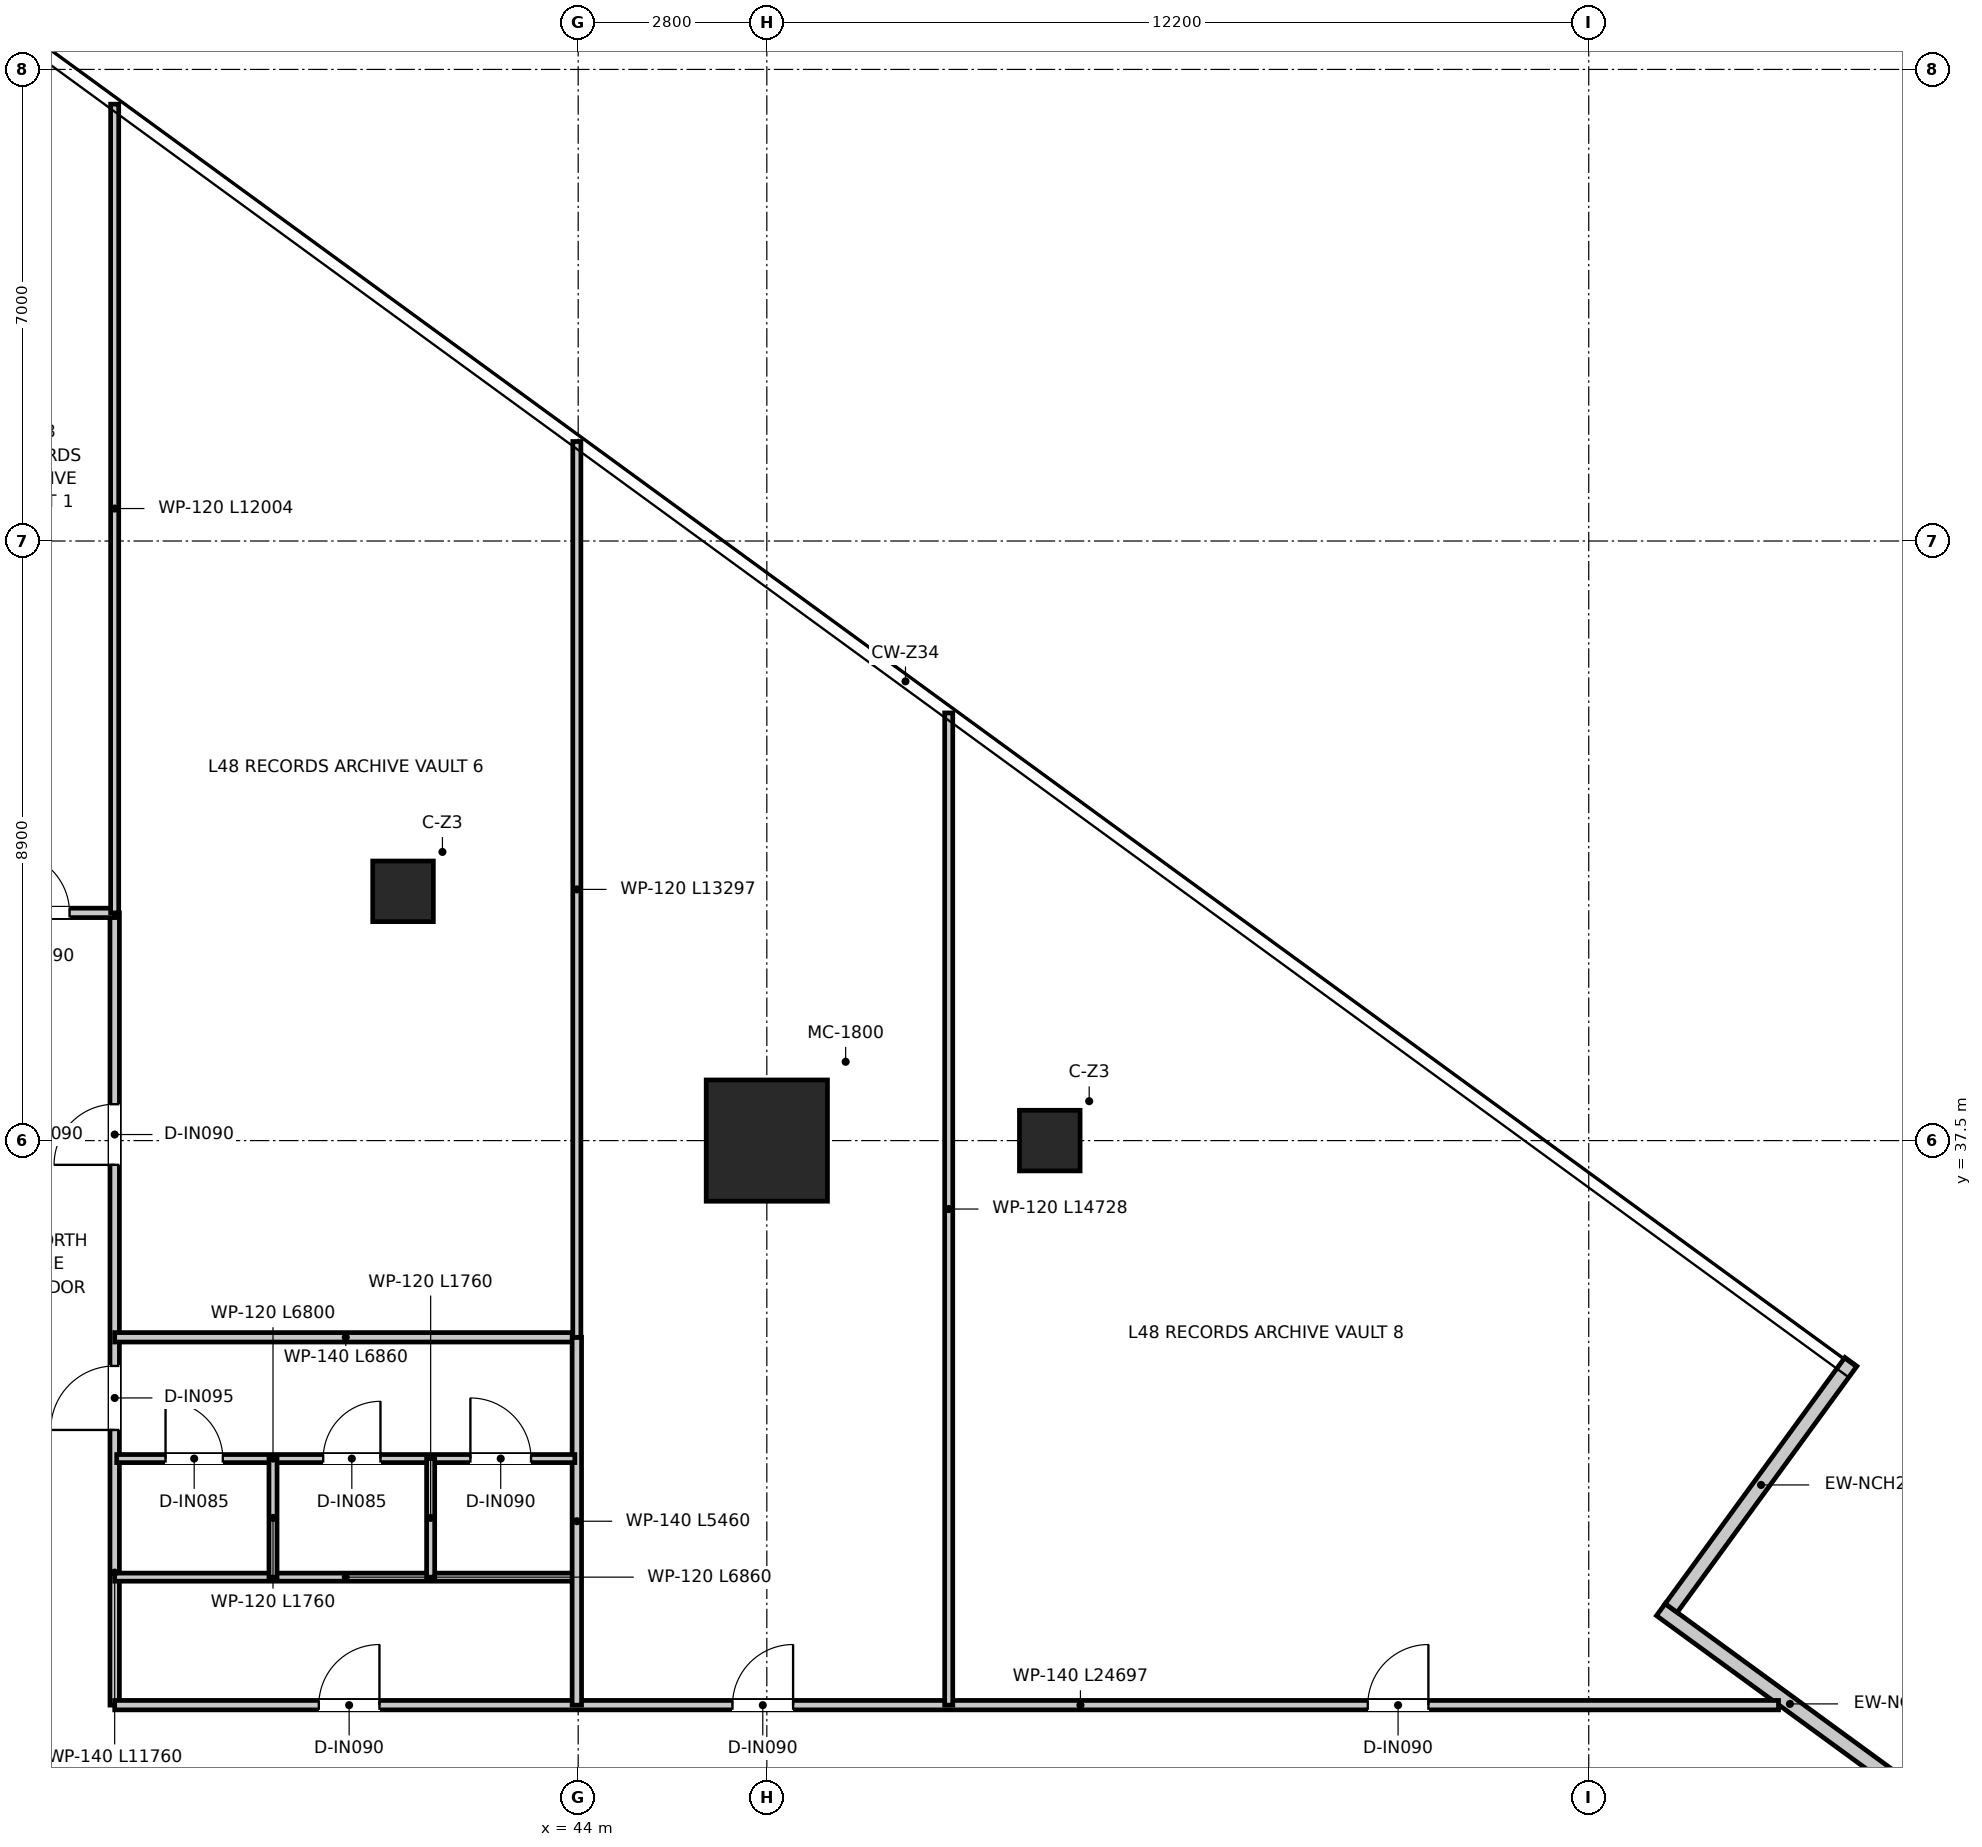
"""IFC4 building model, lengths in metres.
Left out: names, types, materials, properties, quantities, classifications, styles, units other than length and angle.
Written with IfcOpenShell. Run it as: python <this file> out.ifc"""

import sys

from ifc_helpers import new_model, si_unit, direction, frame, frame_2d, origin, origin_2d, place, context, subcontext, project, spatial, rectangle, extrude, source, transform, mapped, element, fill, save


model = new_model("IFC4")
c1 = context("Model", 3, precision=1e-05, world=origin(), true_north=direction((0.0, 1.0)))
c2 = subcontext(c1, "Body", "Model", "MODEL_VIEW")
j1 = project(units=[si_unit("LENGTHUNIT", "METRE"), si_unit("PLANEANGLEUNIT", "RADIAN")], contexts=[c1])
p1 = place(None, origin())
s1 = spatial("IfcSite", under=j1, at=p1, CompositionType="ELEMENT")
p2 = place(p1, origin())
s2 = spatial("IfcBuilding", under=s1, at=p2, CompositionType="ELEMENT")
p3 = place(p2, frame((0.0, 0.0, 197.55)))
s3 = spatial("IfcBuildingStorey", under=s2, at=p3, CompositionType="ELEMENT", Elevation=197.55)
m1 = source(origin(), c2, "Body", "SweptSolid", [
    extrude(rectangle(XDim=1.8, YDim=1.8, at=origin_2d()), origin(), (0.0, 0.0, 1.0), 3.95),
])
p4 = place(p3, frame((46.8, 37.5, 0.0), z_axis=(0.0, 0.0, 1.0), x_axis=(1.0, 0.0, 0.0)))
e1 = element("IfcColumn", 1, at=p4, inside=s3, PredefinedType="USERDEFINED", context=c2, shape_type="MappedRepresentation", body=[
    mapped(m1, transform((0.0, 0.0, 0.0), x_axis=(1.0, 0.0, 0.0), y_axis=(0.0, 1.0, 0.0), z_axis=(0.0, 0.0, 1.0), scale=1.0)),
])
m2 = source(origin(), c2, "Body", "SweptSolid", [
    extrude(rectangle(XDim=0.9, YDim=0.9, at=origin_2d()), origin(), (0.0, 0.0, 1.0), 3.95),
])
for number, where, z_axis, x_axis in (
    (2, (41.4, 41.2, 0.0), (0.0, 0.0, 1.0), (1.0, 0.0, 0.0)),
    (3, (51.0, 37.5, 0.0), (0.0, 0.0, 1.0), (1.0, 0.0, 0.0)),
):
    element("IfcColumn", number, at=place(p3, frame(where, z_axis=z_axis, x_axis=x_axis)), inside=s3, PredefinedType="COLUMN", context=c2, shape_type="MappedRepresentation", body=[
        mapped(m2, transform((0.0, 0.0, 0.0), x_axis=(1.0, 0.0, 0.0), y_axis=(0.0, 1.0, 0.0), z_axis=(0.0, 0.0, 1.0), scale=1.0)),
    ])
p5 = place(p3, frame((63.903, 27.74, 0.0), z_axis=(0.0, 0.0, 1.0), x_axis=(-0.807718106916, 0.58956887618, 0.0)))
e4 = element("IfcWall", 4, at=p5, inside=s3, PredefinedType="ELEMENTEDWALL", context=c2, shape_type="SweptSolid", body=[
    extrude(rectangle(XDim=4.745, YDim=0.22, at=frame_2d((2.373, 0.0))), origin(), (0.0, 0.0, 1.0), 3.59),
])
p6 = place(p3, frame((60.224, 30.561, 0.0), z_axis=(0.0, 0.0, 1.0), x_axis=(0.589547091209, 0.807734007732, 0.0)))
e5 = element("IfcWall", 5, at=p6, inside=s3, PredefinedType="ELEMENTEDWALL", context=c2, shape_type="SweptSolid", body=[
    extrude(rectangle(XDim=4.525, YDim=0.22, at=frame_2d((2.263, 0.0))), origin(), (0.0, 0.0, 1.0), 3.59),
])
p7 = place(p3, frame((37.12, 29.12, 0.0), z_axis=(0.0, 0.0, 1.0), x_axis=(0.0, 1.0, 0.0)))
e6 = element("IfcWall", 6, at=p7, inside=s3, PredefinedType="PARTITIONING", context=c2, shape_type="SweptSolid", body=[
    extrude(rectangle(XDim=11.76, YDim=0.14, at=frame_2d((5.88, 0.0))), origin(), (0.0, 0.0, 1.0), 2.95),
])
p8 = place(p7, frame((4.085, 0.0, 0.0)))
e7 = element("IfcOpeningElement", 7, at=p8, cuts=e6, PredefinedType="OPENING", context=c2, shape_type="SweptSolid", body=[
    extrude(rectangle(XDim=0.95, YDim=2.1, at=frame_2d((0.475, 1.05))), frame((0.0, 0.08, 0.0), z_axis=(0.0, -1.0, 0.0), x_axis=(1.0, 0.0, 0.0)), (0.0, 0.0, 1.0), 0.16),
])
p9 = place(p7, frame((8.02, 0.0, 0.0)))
e8 = element("IfcOpeningElement", 8, at=p9, cuts=e6, PredefinedType="OPENING", context=c2, shape_type="SweptSolid", body=[
    extrude(rectangle(XDim=0.9, YDim=2.1, at=frame_2d((0.45, 1.05))), frame((0.0, 0.08, 0.0), z_axis=(0.0, -1.0, 0.0), x_axis=(1.0, 0.0, 0.0)), (0.0, 0.0, 1.0), 0.16),
])
p10 = place(p3, frame((34.88, 40.88, 0.0), z_axis=(0.0, 0.0, 1.0), x_axis=(1.0, 0.0, 0.0)))
e9 = element("IfcWall", 9, at=p10, inside=s3, PredefinedType="PARTITIONING", context=c2, shape_type="SweptSolid", body=[
    extrude(rectangle(XDim=2.24, YDim=0.14, at=frame_2d((1.12, 0.0))), origin(), (0.0, 0.0, 1.0), 3.59),
])
p11 = place(p10, frame((0.67, 0.0, 0.0)))
e10 = element("IfcOpeningElement", 10, at=p11, cuts=e9, PredefinedType="OPENING", context=c2, shape_type="SweptSolid", body=[
    extrude(rectangle(XDim=0.9, YDim=2.1, at=frame_2d((0.45, 1.05))), frame((0.0, 0.08, 0.0), z_axis=(0.0, -1.0, 0.0), x_axis=(1.0, 0.0, 0.0)), (0.0, 0.0, 1.0), 0.16),
])
p12 = place(p3, frame((37.12, 29.12, 0.0), z_axis=(0.0, 0.0, 1.0), x_axis=(1.0, 0.0, 0.0)))
e11 = element("IfcWall", 11, at=p12, inside=s3, PredefinedType="PARTITIONING", context=c2, shape_type="SweptSolid", body=[
    extrude(rectangle(XDim=24.697, YDim=0.14, at=frame_2d((12.348, 0.0))), origin(), (0.0, 0.0, 1.0), 2.95),
])
p13 = place(p12, frame((3.03, 0.0, 0.0)))
e12 = element("IfcOpeningElement", 12, at=p13, cuts=e11, PredefinedType="OPENING", context=c2, shape_type="SweptSolid", body=[
    extrude(rectangle(XDim=0.9, YDim=2.1, at=frame_2d((0.45, 1.05))), frame((0.0, 0.08, 0.0), z_axis=(0.0, -1.0, 0.0), x_axis=(1.0, 0.0, 0.0)), (0.0, 0.0, 1.0), 0.16),
])
p14 = place(p12, frame((9.17, 0.0, 0.0)))
e13 = element("IfcOpeningElement", 13, at=p14, cuts=e11, PredefinedType="OPENING", context=c2, shape_type="SweptSolid", body=[
    extrude(rectangle(XDim=0.9, YDim=2.1, at=frame_2d((0.45, 1.05))), frame((0.0, 0.08, 0.0), z_axis=(0.0, -1.0, 0.0), x_axis=(1.0, 0.0, 0.0)), (0.0, 0.0, 1.0), 0.16),
])
p15 = place(p12, frame((18.6, 0.0, 0.0)))
e14 = element("IfcOpeningElement", 14, at=p15, cuts=e11, PredefinedType="OPENING", context=c2, shape_type="SweptSolid", body=[
    extrude(rectangle(XDim=0.9, YDim=2.1, at=frame_2d((0.45, 1.05))), frame((0.0, 0.08, 0.0), z_axis=(0.0, -1.0, 0.0), x_axis=(1.0, 0.0, 0.0)), (0.0, 0.0, 1.0), 0.16),
])
p16 = place(p3, frame((37.12, 31.02, 0.0), z_axis=(0.0, 0.0, 1.0), x_axis=(1.0, 0.0, 0.0)))
e15 = element("IfcWall", 15, at=p16, inside=s3, PredefinedType="PARTITIONING", context=c2, shape_type="SweptSolid", body=[
    extrude(rectangle(XDim=6.86, YDim=0.12, at=frame_2d((3.43, 0.0))), origin(), (0.0, 0.0, 1.0), 3.0),
])
p17 = place(p3, frame((37.12, 34.58, 0.0), z_axis=(0.0, 0.0, 1.0), x_axis=(1.0, 0.0, 0.0)))
e16 = element("IfcWall", 16, at=p17, inside=s3, PredefinedType="PARTITIONING", context=c2, shape_type="SweptSolid", body=[
    extrude(rectangle(XDim=6.86, YDim=0.14, at=frame_2d((3.43, 0.0))), origin(), (0.0, 0.0, 1.0), 3.0),
])
p18 = place(p3, frame((43.98, 29.12, 0.0), z_axis=(0.0, 0.0, 1.0), x_axis=(0.0, 1.0, 0.0)))
e17 = element("IfcWall", 17, at=p18, inside=s3, PredefinedType="PARTITIONING", context=c2, shape_type="SweptSolid", body=[
    extrude(rectangle(XDim=5.46, YDim=0.14, at=frame_2d((2.73, 0.0))), origin(), (0.0, 0.0, 1.0), 3.23),
])
p19 = place(p3, frame((37.15, 32.78, 0.0), z_axis=(0.0, 0.0, 1.0), x_axis=(1.0, 0.0, 0.0)))
e18 = element("IfcWall", 18, at=p19, inside=s3, PredefinedType="PARTITIONING", context=c2, shape_type="SweptSolid", body=[
    extrude(rectangle(XDim=6.8, YDim=0.12, at=frame_2d((3.4, 0.0))), origin(), (0.0, 0.0, 1.0), 3.0),
])
p20 = place(p19, frame((0.725, 0.0, 0.0)))
e19 = element("IfcOpeningElement", 19, at=p20, cuts=e18, PredefinedType="OPENING", context=c2, shape_type="SweptSolid", body=[
    extrude(rectangle(XDim=0.85, YDim=2.1, at=frame_2d((0.425, 1.05))), frame((0.0, 0.07, 0.0), z_axis=(0.0, -1.0, 0.0), x_axis=(1.0, 0.0, 0.0)), (0.0, 0.0, 1.0), 0.14),
])
p21 = place(p19, frame((3.065, 0.0, 0.0)))
e20 = element("IfcOpeningElement", 20, at=p21, cuts=e18, PredefinedType="OPENING", context=c2, shape_type="SweptSolid", body=[
    extrude(rectangle(XDim=0.85, YDim=2.1, at=frame_2d((0.425, 1.05))), frame((0.0, 0.07, 0.0), z_axis=(0.0, -1.0, 0.0), x_axis=(1.0, 0.0, 0.0)), (0.0, 0.0, 1.0), 0.14),
])
p22 = place(p19, frame((5.25, 0.0, 0.0)))
e21 = element("IfcOpeningElement", 21, at=p22, cuts=e18, PredefinedType="OPENING", context=c2, shape_type="SweptSolid", body=[
    extrude(rectangle(XDim=0.9, YDim=2.1, at=frame_2d((0.45, 1.05))), frame((0.0, 0.07, 0.0), z_axis=(0.0, -1.0, 0.0), x_axis=(1.0, 0.0, 0.0)), (0.0, 0.0, 1.0), 0.14),
])
for number, where, z_axis, x_axis in (
    (22, (39.47, 31.02, 0.0), (0.0, 0.0, 1.0), (0.0, 1.0, 0.0)),
    (23, (41.81, 31.02, 0.0), (0.0, 0.0, 1.0), (0.0, 1.0, 0.0)),
):
    element("IfcWall", number, at=place(p3, frame(where, z_axis=z_axis, x_axis=x_axis)), inside=s3, PredefinedType="PARTITIONING", context=c2, shape_type="SweptSolid", body=[
        extrude(rectangle(XDim=1.76, YDim=0.12, at=frame_2d((0.88, 0.0))), origin(), (0.0, 0.0, 1.0), 3.59),
    ])
p23 = place(p3, frame((37.12, 40.88, 0.0), z_axis=(0.0, 0.0, 1.0), x_axis=(0.0, 1.0, 0.0)))
e24 = element("IfcWall", 24, at=p23, inside=s3, PredefinedType="PARTITIONING", context=c2, shape_type="SweptSolid", body=[
    extrude(rectangle(XDim=12.004, YDim=0.12, at=frame_2d((6.002, 0.0))), origin(), (0.0, 0.0, 1.0), 3.2),
])
p24 = place(p3, frame((43.98, 34.58, 0.0), z_axis=(0.0, 0.0, 1.0), x_axis=(0.0, 1.0, 0.0)))
e25 = element("IfcWall", 25, at=p24, inside=s3, PredefinedType="PARTITIONING", context=c2, shape_type="SweptSolid", body=[
    extrude(rectangle(XDim=13.297, YDim=0.12, at=frame_2d((6.648, 0.0))), origin(), (0.0, 0.0, 1.0), 2.95),
])
p25 = place(p3, frame((49.5, 29.12, 0.0), z_axis=(0.0, 0.0, 1.0), x_axis=(0.0, 1.0, 0.0)))
e26 = element("IfcWall", 26, at=p25, inside=s3, PredefinedType="PARTITIONING", context=c2, shape_type="SweptSolid", body=[
    extrude(rectangle(XDim=14.728, YDim=0.12, at=frame_2d((7.364, 0.0))), origin(), (0.0, 0.0, 1.0), 3.0),
])
p26 = place(p13, origin())
e27 = element("IfcDoor", 27, at=p26, inside=s3, OperationType="SINGLE_SWING_RIGHT", PredefinedType="DOOR", context=c2, shape_type="SweptSolid", body=[
    extrude(rectangle(XDim=0.9, YDim=2.1, at=frame_2d((0.45, 1.05))), frame((0.0, 0.025, 0.0), z_axis=(0.0, -1.0, 0.0), x_axis=(1.0, 0.0, 0.0)), (0.0, 0.0, 1.0), 0.05),
])
fill(e12, e27)
p27 = place(p8, origin())
e28 = element("IfcDoor", 28, at=p27, inside=s3, OperationType="SINGLE_SWING_LEFT", PredefinedType="DOOR", context=c2, shape_type="SweptSolid", body=[
    extrude(rectangle(XDim=0.95, YDim=2.1, at=frame_2d((0.475, 1.05))), frame((0.0, 0.025, 0.0), z_axis=(0.0, -1.0, 0.0), x_axis=(1.0, 0.0, 0.0)), (0.0, 0.0, 1.0), 0.05),
])
fill(e7, e28)
p28 = place(p20, origin())
e29 = element("IfcDoor", 29, at=p28, inside=s3, OperationType="SINGLE_SWING_LEFT", PredefinedType="DOOR", context=c2, shape_type="SweptSolid", body=[
    extrude(rectangle(XDim=0.85, YDim=2.1, at=frame_2d((0.425, 1.05))), frame((0.0, 0.025, 0.0), z_axis=(0.0, -1.0, 0.0), x_axis=(1.0, 0.0, 0.0)), (0.0, 0.0, 1.0), 0.05),
])
fill(e19, e29)
p29 = place(p21, origin())
e30 = element("IfcDoor", 30, at=p29, inside=s3, OperationType="SINGLE_SWING_RIGHT", PredefinedType="DOOR", context=c2, shape_type="SweptSolid", body=[
    extrude(rectangle(XDim=0.85, YDim=2.1, at=frame_2d((0.425, 1.05))), frame((0.0, 0.025, 0.0), z_axis=(0.0, -1.0, 0.0), x_axis=(1.0, 0.0, 0.0)), (0.0, 0.0, 1.0), 0.05),
])
fill(e20, e30)
p30 = place(p22, origin())
e31 = element("IfcDoor", 31, at=p30, inside=s3, OperationType="SINGLE_SWING_LEFT", PredefinedType="DOOR", context=c2, shape_type="SweptSolid", body=[
    extrude(rectangle(XDim=0.9, YDim=2.1, at=frame_2d((0.45, 1.05))), frame((0.0, 0.025, 0.0), z_axis=(0.0, -1.0, 0.0), x_axis=(1.0, 0.0, 0.0)), (0.0, 0.0, 1.0), 0.05),
])
fill(e21, e31)
p31 = place(p11, origin())
e32 = element("IfcDoor", 32, at=p31, inside=s3, OperationType="SINGLE_SWING_LEFT", PredefinedType="DOOR", context=c2, shape_type="SweptSolid", body=[
    extrude(rectangle(XDim=0.9, YDim=2.1, at=frame_2d((0.45, 1.05))), frame((0.0, 0.025, 0.0), z_axis=(0.0, -1.0, 0.0), x_axis=(1.0, 0.0, 0.0)), (0.0, 0.0, 1.0), 0.05),
])
fill(e10, e32)
p32 = place(p9, origin())
e33 = element("IfcDoor", 33, at=p32, inside=s3, OperationType="SINGLE_SWING_LEFT", PredefinedType="DOOR", context=c2, shape_type="SweptSolid", body=[
    extrude(rectangle(XDim=0.9, YDim=2.1, at=frame_2d((0.45, 1.05))), frame((0.0, 0.025, 0.0), z_axis=(0.0, -1.0, 0.0), x_axis=(1.0, 0.0, 0.0)), (0.0, 0.0, 1.0), 0.05),
])
fill(e8, e33)
p33 = place(p14, origin())
e34 = element("IfcDoor", 34, at=p33, inside=s3, OperationType="SINGLE_SWING_RIGHT", PredefinedType="DOOR", context=c2, shape_type="SweptSolid", body=[
    extrude(rectangle(XDim=0.9, YDim=2.1, at=frame_2d((0.45, 1.05))), frame((0.0, 0.025, 0.0), z_axis=(0.0, -1.0, 0.0), x_axis=(1.0, 0.0, 0.0)), (0.0, 0.0, 1.0), 0.05),
])
fill(e13, e34)
p34 = place(p15, origin())
e35 = element("IfcDoor", 35, at=p34, inside=s3, OperationType="SINGLE_SWING_RIGHT", PredefinedType="DOOR", context=c2, shape_type="SweptSolid", body=[
    extrude(rectangle(XDim=0.9, YDim=2.1, at=frame_2d((0.45, 1.05))), frame((0.0, 0.025, 0.0), z_axis=(0.0, -1.0, 0.0), x_axis=(1.0, 0.0, 0.0)), (0.0, 0.0, 1.0), 0.05),
])
fill(e14, e35)
save(model, sys.argv[1])
